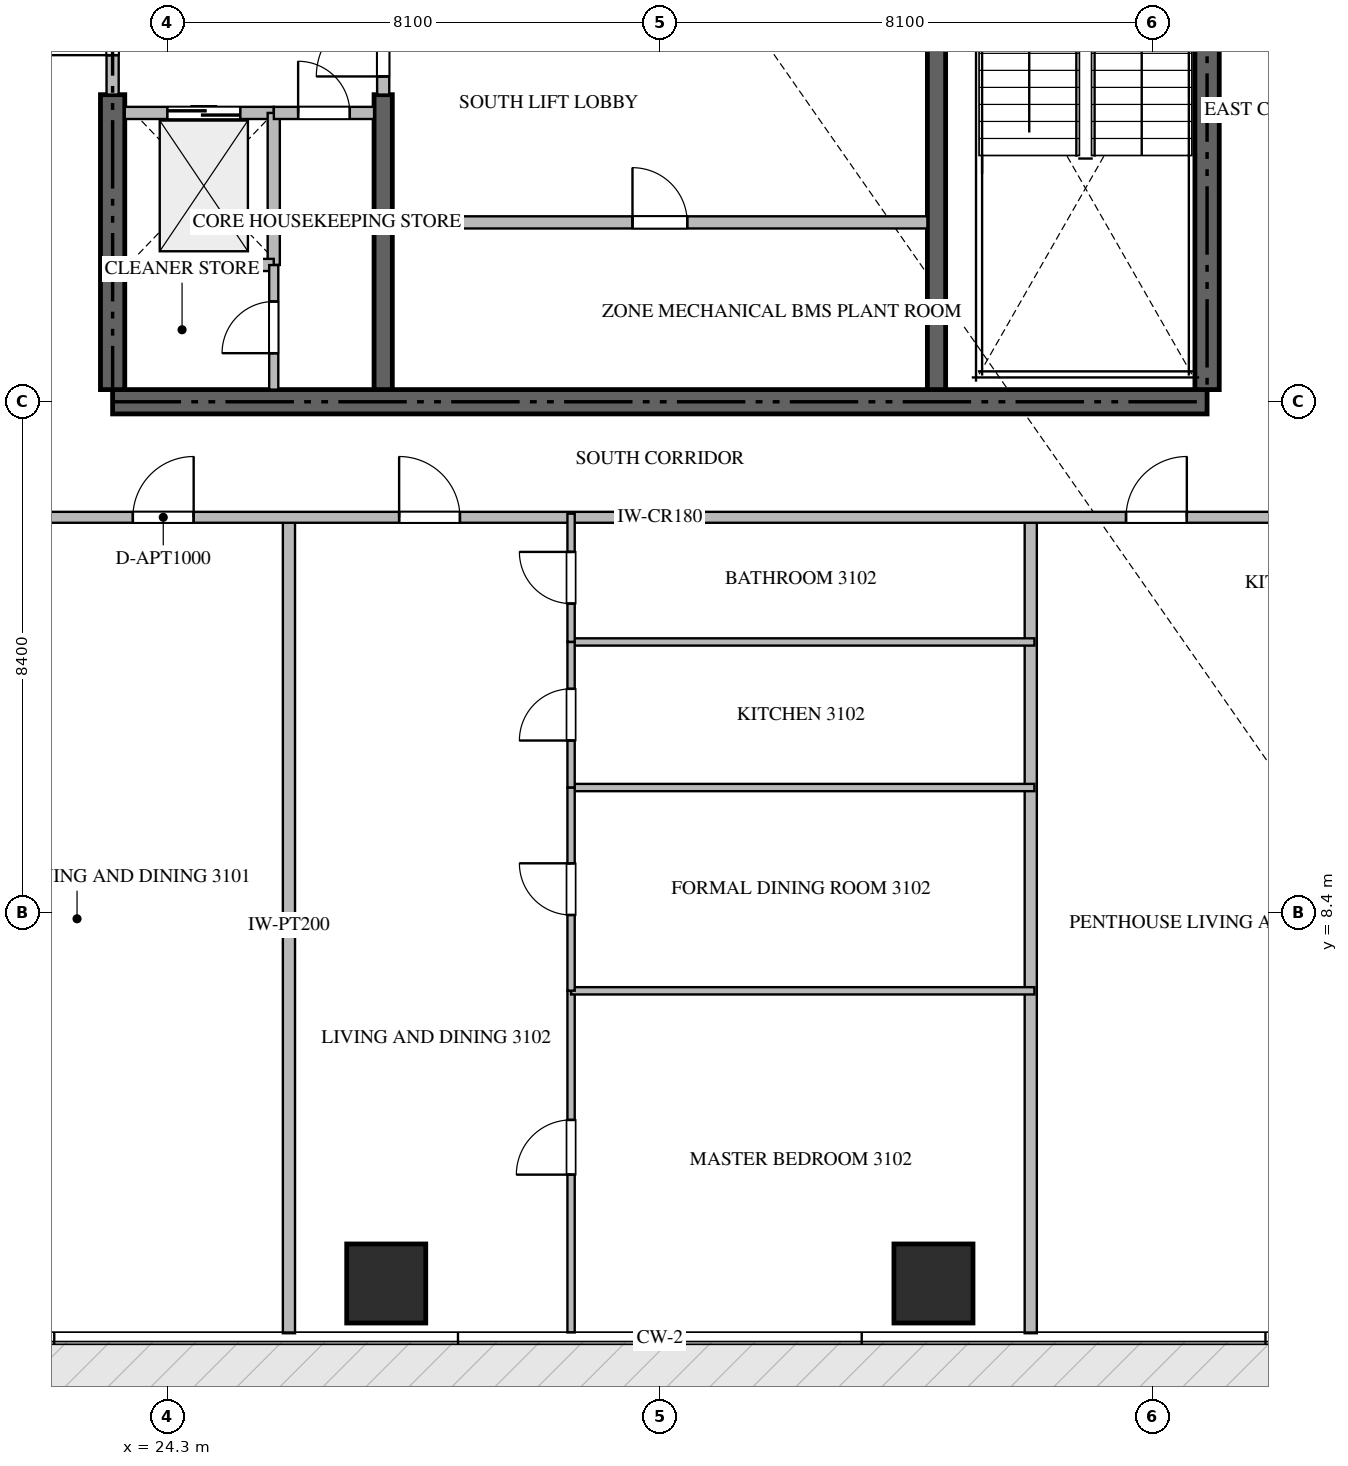
"""IFC4 building model, lengths in metres.
Left out: names, types, materials, properties, quantities, classifications, styles, units other than length and angle.
Written with IfcOpenShell. Run it as: python <this file> out.ifc"""

import sys

from ifc_helpers import new_model, si_unit, direction, frame, frame_2d, origin, origin_2d, place, context, subcontext, project, spatial, rectangle, extrude, source, transform, mapped, element, fill, save


model = new_model("IFC4")
c1 = context("Model", 3, precision=1e-05, world=origin(), true_north=direction((0.0, 1.0)))
c2 = subcontext(c1, "Body", "Model", "MODEL_VIEW")
j1 = project(units=[si_unit("LENGTHUNIT", "METRE"), si_unit("PLANEANGLEUNIT", "RADIAN")], contexts=[c1])
p1 = place(None, origin())
s1 = spatial("IfcSite", under=j1, at=p1, CompositionType="ELEMENT")
p2 = place(p1, origin())
s2 = spatial("IfcBuilding", under=s1, at=p2, CompositionType="ELEMENT")
p3 = place(p2, frame((0.0, 0.0, 127.65)))
s3 = spatial("IfcBuildingStorey", under=s2, at=p3, CompositionType="ELEMENT", Elevation=127.65)
p4 = place(p3, frame((23.4, 16.8, -0.26), z_axis=(0.0, 0.0, 1.0), x_axis=(1.0, 0.0, 0.0)))
e1 = element("IfcWall", 1, at=p4, inside=s3, PredefinedType="SHEAR", context=c2, shape_type="SweptSolid", body=[
    extrude(rectangle(XDim=18.0, YDim=0.4, at=frame_2d((9.0, 0.0))), origin(), (0.0, 0.0, 1.0), 3.748),
])
p5 = place(p3, frame((23.4, 17.0, -0.26), z_axis=(0.0, 0.0, 1.0), x_axis=(0.0, 1.0, 0.0)))
e2 = element("IfcWall", 2, at=p5, inside=s3, PredefinedType="SHEAR", context=c2, shape_type="SweptSolid", body=[
    extrude(rectangle(XDim=4.85, YDim=0.4, at=frame_2d((2.425, 0.0))), origin(), (0.0, 0.0, 1.0), 3.748),
])
p6 = place(p3, frame((41.4, 17.0, -0.26), z_axis=(0.0, 0.0, 1.0), x_axis=(0.0, 1.0, 0.0)))
e3 = element("IfcWall", 3, at=p6, inside=s3, PredefinedType="SHEAR", context=c2, shape_type="SweptSolid", body=[
    extrude(rectangle(XDim=8.35, YDim=0.4, at=frame_2d((4.175, 0.0))), origin(), (0.0, 0.0, 1.0), 3.748),
])
p7 = place(p3, frame((27.85, 17.0, -0.26), z_axis=(0.0, 0.0, 1.0), x_axis=(0.0, 1.0, 0.0)))
e4 = element("IfcWall", 4, at=p7, inside=s3, PredefinedType="SHEAR", context=c2, shape_type="SweptSolid", body=[
    extrude(rectangle(XDim=4.85, YDim=0.3, at=frame_2d((2.425, 0.0))), origin(), (0.0, 0.0, 1.0), 3.748),
])
p8 = place(p3, frame((36.95, 17.0, -0.26), z_axis=(0.0, 0.0, 1.0), x_axis=(0.0, 1.0, 0.0)))
e5 = element("IfcWall", 5, at=p8, inside=s3, PredefinedType="SHEAR", context=c2, shape_type="SweptSolid", body=[
    extrude(rectangle(XDim=8.35, YDim=0.3, at=frame_2d((4.175, 0.0))), origin(), (0.0, 0.0, 1.0), 3.748),
])
m1 = source(origin(), c2, "Body", "SweptSolid", [
    extrude(rectangle(XDim=1.3, YDim=1.3, at=origin_2d()), origin(), (0.0, 0.0, 1.0), 3.75),
])
for number, where, z_axis, x_axis in (
    (6, (27.9, 2.3, -0.26), (0.0, 0.0, 1.0), (1.0, 0.0, 0.0)),
    (7, (36.9, 2.3, -0.26), (0.0, 0.0, 1.0), (1.0, 0.0, 0.0)),
):
    element("IfcColumn", number, at=place(p3, frame(where, z_axis=z_axis, x_axis=x_axis)), inside=s3, PredefinedType="COLUMN", context=c2, shape_type="MappedRepresentation", body=[
        mapped(m1, transform((0.0, 0.0, 0.0), scale=1.0)),
    ])
p9 = place(p3, frame((23.6, 21.55, 0.0), z_axis=(0.0, 0.0, 1.0), x_axis=(1.0, 0.0, 0.0)))
e8 = element("IfcWall", 8, at=p9, inside=s3, PredefinedType="STANDARD", context=c2, shape_type="SweptSolid", body=[
    extrude(rectangle(XDim=2.45, YDim=0.2, at=frame_2d((1.225, 0.0))), origin(), (0.0, 0.0, 1.0), 3.49),
])
p10 = place(p9, frame((0.7, 0.0, 0.0)))
e9 = element("IfcOpeningElement", 9, at=p10, cuts=e8, PredefinedType="OPENING", context=c2, shape_type="SweptSolid", body=[
    extrude(rectangle(XDim=1.2, YDim=2.2, at=frame_2d((0.6, 1.1))), frame((0.0, 0.11, 0.0), z_axis=(0.0, -1.0, 0.0), x_axis=(1.0, 0.0, 0.0)), (0.0, 0.0, 1.0), 0.22),
])
p11 = place(p3, frame((26.05, 19.05, 0.0), z_axis=(0.0, 0.0, 1.0), x_axis=(0.0, 1.0, 0.0)))
e10 = element("IfcWall", 10, at=p11, inside=s3, PredefinedType="STANDARD", context=c2, shape_type="SweptSolid", body=[
    extrude(rectangle(XDim=2.5, YDim=0.2, at=frame_2d((1.25, 0.0))), origin(), (0.0, 0.0, 1.0), 3.49),
])
p12 = place(p3, frame((23.6, 19.05, 0.0), z_axis=(0.0, 0.0, 1.0), x_axis=(1.0, 0.0, 0.0)))
e11 = element("IfcWall", 11, at=p12, inside=s3, PredefinedType="STANDARD", context=c2, shape_type="SweptSolid", body=[
    extrude(rectangle(XDim=2.45, YDim=0.2, at=frame_2d((1.225, 0.0))), origin(), (0.0, 0.0, 1.0), 3.49),
])
p13 = place(p3, frame((26.052, 21.55, 0.0), z_axis=(0.0, 0.0, 1.0), x_axis=(1.0, 0.0, 0.0)))
e12 = element("IfcWall", 12, at=p13, inside=s3, PredefinedType="STANDARD", context=c2, shape_type="SweptSolid", body=[
    extrude(rectangle(XDim=1.648, YDim=0.2, at=frame_2d((0.824, 0.0))), origin(), (0.0, 0.0, 1.0), 3.49),
])
p14 = place(p13, frame((0.399, 0.0, 0.0)))
e13 = element("IfcOpeningElement", 13, at=p14, cuts=e12, PredefinedType="OPENING", context=c2, shape_type="SweptSolid", body=[
    extrude(rectangle(XDim=0.85, YDim=2.1, at=frame_2d((0.425, 1.05))), frame((0.0, 0.11, 0.0), z_axis=(0.0, -1.0, 0.0), x_axis=(1.0, 0.0, 0.0)), (0.0, 0.0, 1.0), 0.22),
])
p15 = place(p3, frame((23.4, 21.852, 0.0), z_axis=(0.0, 0.0, 1.0), x_axis=(0.0, 1.0, 0.0)))
e14 = element("IfcWall", 14, at=p15, inside=s3, PredefinedType="STANDARD", context=c2, shape_type="SweptSolid", body=[
    extrude(rectangle(XDim=2.396, YDim=0.2, at=frame_2d((1.198, 0.0))), origin(), (0.0, 0.0, 1.0), 3.49),
])
p16 = place(p15, frame((0.648, 0.0, 0.0)))
e15 = element("IfcOpeningElement", 15, at=p16, cuts=e14, PredefinedType="OPENING", context=c2, shape_type="SweptSolid", body=[
    extrude(rectangle(XDim=1.1, YDim=2.15, at=frame_2d((0.55, 1.075))), frame((0.0, 0.11, 0.0), z_axis=(0.0, -1.0, 0.0), x_axis=(1.0, 0.0, 0.0)), (0.0, 0.0, 1.0), 0.22),
])
p17 = place(p3, frame((27.85, 21.852, 0.0), z_axis=(0.0, 0.0, 1.0), x_axis=(0.0, 1.0, 0.0)))
e16 = element("IfcWall", 16, at=p17, inside=s3, PredefinedType="STANDARD", context=c2, shape_type="SweptSolid", body=[
    extrude(rectangle(XDim=1.696, YDim=0.2, at=frame_2d((0.848, 0.0))), origin(), (0.0, 0.0, 1.0), 3.49),
])
p18 = place(p17, frame((0.298, 0.0, 0.0)))
e17 = element("IfcOpeningElement", 17, at=p18, cuts=e16, PredefinedType="OPENING", context=c2, shape_type="SweptSolid", body=[
    extrude(rectangle(XDim=1.1, YDim=2.15, at=frame_2d((0.55, 1.075))), frame((0.0, 0.11, 0.0), z_axis=(0.0, -1.0, 0.0), x_axis=(1.0, 0.0, 0.0)), (0.0, 0.0, 1.0), 0.22),
])
p19 = place(p3, frame((26.05, 17.0, 0.0), z_axis=(0.0, 0.0, 1.0), x_axis=(0.0, 1.0, 0.0)))
e18 = element("IfcWall", 18, at=p19, inside=s3, PredefinedType="PARTITIONING", context=c2, shape_type="SweptSolid", body=[
    extrude(rectangle(XDim=2.048, YDim=0.15, at=frame_2d((1.024, 0.0))), origin(), (0.0, 0.0, 1.0), 3.49),
])
p20 = place(p19, frame((0.599, 0.0, 0.0)))
e19 = element("IfcOpeningElement", 19, at=p20, cuts=e18, PredefinedType="OPENING", context=c2, shape_type="SweptSolid", body=[
    extrude(rectangle(XDim=0.85, YDim=2.1, at=frame_2d((0.425, 1.05))), frame((0.0, 0.085, 0.0), z_axis=(0.0, -1.0, 0.0), x_axis=(1.0, 0.0, 0.0)), (0.0, 0.0, 1.0), 0.17),
])
p21 = place(p3, frame((28.0, 19.75, 0.0), z_axis=(0.0, 0.0, 1.0), x_axis=(1.0, 0.0, 0.0)))
e20 = element("IfcWall", 20, at=p21, inside=s3, PredefinedType="STANDARD", context=c2, shape_type="SweptSolid", body=[
    extrude(rectangle(XDim=8.8, YDim=0.2, at=frame_2d((4.4, 0.0))), origin(), (0.0, 0.0, 1.0), 3.49),
])
p22 = place(p21, frame((3.95, 0.0, 0.0)))
e21 = element("IfcOpeningElement", 21, at=p22, cuts=e20, PredefinedType="OPENING", context=c2, shape_type="SweptSolid", body=[
    extrude(rectangle(XDim=0.9, YDim=2.1, at=frame_2d((0.45, 1.05))), frame((0.0, 0.11, 0.0), z_axis=(0.0, -1.0, 0.0), x_axis=(1.0, 0.0, 0.0)), (0.0, 0.0, 1.0), 0.22),
])
for number, where, z_axis, x_axis in (
    (22, (26.3, 1.482, 0.0), (0.0, 0.0, 1.0), (0.0, 1.0, 0.0)),
    (23, (38.5, 1.482, 0.0), (0.0, 0.0, 1.0), (0.0, 1.0, 0.0)),
):
    element("IfcWall", number, at=place(p3, frame(where, z_axis=z_axis, x_axis=x_axis)), inside=s3, PredefinedType="PARTITIONING", context=c2, shape_type="SweptSolid", body=[
        extrude(rectangle(XDim=13.418, YDim=0.2, at=frame_2d((6.709, 0.0))), origin(), (0.0, 0.0, 1.0), 3.49),
    ])
p23 = place(p3, frame((20.952, 14.9, 0.0), z_axis=(0.0, 0.0, 1.0), x_axis=(1.0, 0.0, 0.0)))
e24 = element("IfcWall", 24, at=p23, inside=s3, PredefinedType="PARTITIONING", context=c2, shape_type="SweptSolid", body=[
    extrude(rectangle(XDim=22.896, YDim=0.18, at=frame_2d((11.448, 0.0))), origin(), (0.0, 0.0, 1.0), 3.49),
])
p24 = place(p23, frame((2.781, 0.0, 0.0)))
e25 = element("IfcOpeningElement", 25, at=p24, cuts=e24, PredefinedType="OPENING", context=c2, shape_type="SweptSolid", body=[
    extrude(rectangle(XDim=1.0, YDim=2.15, at=frame_2d((0.5, 1.075))), frame((0.0, 0.1, 0.0), z_axis=(0.0, -1.0, 0.0), x_axis=(1.0, 0.0, 0.0)), (0.0, 0.0, 1.0), 0.2),
])
p25 = place(p23, frame((7.16, 0.0, 0.0)))
e26 = element("IfcOpeningElement", 26, at=p25, cuts=e24, PredefinedType="OPENING", context=c2, shape_type="SweptSolid", body=[
    extrude(rectangle(XDim=1.0, YDim=2.15, at=frame_2d((0.5, 1.075))), frame((0.0, 0.1, 0.0), z_axis=(0.0, -1.0, 0.0), x_axis=(1.0, 0.0, 0.0)), (0.0, 0.0, 1.0), 0.2),
])
p26 = place(p23, frame((19.115, 0.0, 0.0)))
e27 = element("IfcOpeningElement", 27, at=p26, cuts=e24, PredefinedType="OPENING", context=c2, shape_type="SweptSolid", body=[
    extrude(rectangle(XDim=1.0, YDim=2.15, at=frame_2d((0.5, 1.075))), frame((0.0, 0.1, 0.0), z_axis=(0.0, -1.0, 0.0), x_axis=(1.0, 0.0, 0.0)), (0.0, 0.0, 1.0), 0.2),
])
p27 = place(p3, frame((30.94, 1.495, 0.0), z_axis=(0.0, 0.0, 1.0), x_axis=(0.0, 1.0, 0.0)))
e28 = element("IfcWall", 28, at=p27, inside=s3, PredefinedType="PARTITIONING", context=c2, shape_type="SweptSolid", body=[
    extrude(rectangle(XDim=5.618, YDim=0.12, at=frame_2d((2.809, 0.0))), origin(), (0.0, 0.0, 1.0), 3.49),
])
p28 = place(p27, frame((2.595, 0.0, 0.0)))
e29 = element("IfcOpeningElement", 29, at=p28, cuts=e28, PredefinedType="OPENING", context=c2, shape_type="SweptSolid", body=[
    extrude(rectangle(XDim=0.9, YDim=2.1, at=frame_2d((0.45, 1.05))), frame((0.0, 0.07, 0.0), z_axis=(0.0, -1.0, 0.0), x_axis=(1.0, 0.0, 0.0)), (0.0, 0.0, 1.0), 0.14),
])
p29 = place(p3, frame((30.94, 7.113, 0.0), z_axis=(0.0, 0.0, 1.0), x_axis=(1.0, 0.0, 0.0)))
e30 = element("IfcWall", 30, at=p29, inside=s3, PredefinedType="PARTITIONING", context=c2, shape_type="SweptSolid", body=[
    extrude(rectangle(XDim=7.62, YDim=0.12, at=frame_2d((3.81, 0.0))), origin(), (0.0, 0.0, 1.0), 3.49),
])
p30 = place(p3, frame((30.94, 10.456, 0.0), z_axis=(0.0, 0.0, 1.0), x_axis=(1.0, 0.0, 0.0)))
e31 = element("IfcWall", 31, at=p30, inside=s3, PredefinedType="PARTITIONING", context=c2, shape_type="SweptSolid", body=[
    extrude(rectangle(XDim=7.62, YDim=0.12, at=frame_2d((3.81, 0.0))), origin(), (0.0, 0.0, 1.0), 2.972),
])
p31 = place(p3, frame((30.94, 12.85, 0.0), z_axis=(0.0, 0.0, 1.0), x_axis=(1.0, 0.0, 0.0)))
e32 = element("IfcWall", 32, at=p31, inside=s3, PredefinedType="PARTITIONING", context=c2, shape_type="SweptSolid", body=[
    extrude(rectangle(XDim=7.62, YDim=0.12, at=frame_2d((3.81, 0.0))), origin(), (0.0, 0.0, 1.0), 3.49),
])
p32 = place(p3, frame((30.94, 7.115, 0.0), z_axis=(0.0, 0.0, 1.0), x_axis=(0.0, 1.0, 0.0)))
e33 = element("IfcWall", 33, at=p32, inside=s3, PredefinedType="PARTITIONING", context=c2, shape_type="SweptSolid", body=[
    extrude(rectangle(XDim=3.341, YDim=0.12, at=frame_2d((1.67, 0.0))), origin(), (0.0, 0.0, 1.0), 3.49),
])
p33 = place(p32, frame((1.245, 0.0, 0.0)))
e34 = element("IfcOpeningElement", 34, at=p33, cuts=e33, PredefinedType="OPENING", context=c2, shape_type="SweptSolid", body=[
    extrude(rectangle(XDim=0.85, YDim=2.1, at=frame_2d((0.425, 1.05))), frame((0.0, 0.07, 0.0), z_axis=(0.0, -1.0, 0.0), x_axis=(1.0, 0.0, 0.0)), (0.0, 0.0, 1.0), 0.14),
])
p34 = place(p3, frame((30.94, 10.458, 0.0), z_axis=(0.0, 0.0, 1.0), x_axis=(0.0, 1.0, 0.0)))
e35 = element("IfcWall", 35, at=p34, inside=s3, PredefinedType="PARTITIONING", context=c2, shape_type="SweptSolid", body=[
    extrude(rectangle(XDim=2.392, YDim=0.12, at=frame_2d((1.196, 0.0))), origin(), (0.0, 0.0, 1.0), 3.49),
])
p35 = place(p34, frame((0.771, 0.0, 0.0)))
e36 = element("IfcOpeningElement", 36, at=p35, cuts=e35, PredefinedType="OPENING", context=c2, shape_type="SweptSolid", body=[
    extrude(rectangle(XDim=0.85, YDim=2.1, at=frame_2d((0.425, 1.05))), frame((0.0, 0.07, 0.0), z_axis=(0.0, -1.0, 0.0), x_axis=(1.0, 0.0, 0.0)), (0.0, 0.0, 1.0), 0.14),
])
p36 = place(p3, frame((30.94, 12.852, 0.0), z_axis=(0.0, 0.0, 1.0), x_axis=(0.0, 1.0, 0.0)))
e37 = element("IfcWall", 37, at=p36, inside=s3, PredefinedType="PARTITIONING", context=c2, shape_type="SweptSolid", body=[
    extrude(rectangle(XDim=2.108, YDim=0.12, at=frame_2d((1.054, 0.0))), origin(), (0.0, 0.0, 1.0), 3.49),
])
p37 = place(p36, frame((0.629, 0.0, 0.0)))
e38 = element("IfcOpeningElement", 38, at=p37, cuts=e37, PredefinedType="OPENING", context=c2, shape_type="SweptSolid", body=[
    extrude(rectangle(XDim=0.85, YDim=2.1, at=frame_2d((0.425, 1.05))), frame((0.0, 0.07, 0.0), z_axis=(0.0, -1.0, 0.0), x_axis=(1.0, 0.0, 0.0)), (0.0, 0.0, 1.0), 0.14),
])
m2 = source(origin(), c2, "Body", "SweptSolid", [
    extrude(rectangle(XDim=1.2, YDim=2.2, at=frame_2d((0.6, 1.1))), frame((0.0, 0.025, 0.0), z_axis=(0.0, -1.0, 0.0), x_axis=(1.0, 0.0, 0.0)), (0.0, 0.0, 1.0), 0.05),
])
p38 = place(p10, origin())
e39 = element("IfcDoor", 39, at=p38, inside=s3, OperationType="DOUBLE_DOOR_SLIDING", PredefinedType="DOOR", context=c2, shape_type="MappedRepresentation", body=[
    mapped(m2, transform((0.0, 0.0, 0.0), scale=1.0)),
])
fill(e9, e39)
m3 = source(origin(), c2, "Body", "SweptSolid", [
    extrude(rectangle(XDim=0.85, YDim=2.1, at=frame_2d((0.425, 1.05))), frame((0.0, 0.025, 0.0), z_axis=(0.0, -1.0, 0.0), x_axis=(1.0, 0.0, 0.0)), (0.0, 0.0, 1.0), 0.05),
])
p39 = place(p14, origin())
e40 = element("IfcDoor", 40, at=p39, inside=s3, OperationType="SINGLE_SWING_LEFT", PredefinedType="DOOR", context=c2, shape_type="MappedRepresentation", body=[
    mapped(m3, transform((0.0, 0.0, 0.0), scale=1.0)),
])
fill(e13, e40)
m4 = source(origin(), c2, "Body", "SweptSolid", [
    extrude(rectangle(XDim=1.1, YDim=2.15, at=frame_2d((0.55, 1.075))), frame((0.0, 0.025, 0.0), z_axis=(0.0, -1.0, 0.0), x_axis=(1.0, 0.0, 0.0)), (0.0, 0.0, 1.0), 0.05),
])
p40 = place(p16, origin())
e41 = element("IfcDoor", 41, at=p40, inside=s3, OperationType="SINGLE_SWING_LEFT", PredefinedType="DOOR", context=c2, shape_type="MappedRepresentation", body=[
    mapped(m4, transform((0.0, 0.0, 0.0), scale=1.0)),
])
fill(e15, e41)
p41 = place(p18, origin())
e42 = element("IfcDoor", 42, at=p41, inside=s3, OperationType="SINGLE_SWING_LEFT", PredefinedType="DOOR", context=c2, shape_type="MappedRepresentation", body=[
    mapped(m4, transform((0.0, 0.0, 0.0), scale=1.0)),
])
fill(e17, e42)
p42 = place(p20, origin())
e43 = element("IfcDoor", 43, at=p42, inside=s3, OperationType="SINGLE_SWING_LEFT", PredefinedType="DOOR", context=c2, shape_type="MappedRepresentation", body=[
    mapped(m3, transform((0.0, 0.0, 0.0), scale=1.0)),
])
fill(e19, e43)
m5 = source(origin(), c2, "Body", "SweptSolid", [
    extrude(rectangle(XDim=0.9, YDim=2.1, at=frame_2d((0.45, 1.05))), frame((0.0, 0.025, 0.0), z_axis=(0.0, -1.0, 0.0), x_axis=(1.0, 0.0, 0.0)), (0.0, 0.0, 1.0), 0.05),
])
p43 = place(p22, origin())
e44 = element("IfcDoor", 44, at=p43, inside=s3, OperationType="SINGLE_SWING_LEFT", PredefinedType="DOOR", context=c2, shape_type="MappedRepresentation", body=[
    mapped(m5, transform((0.0, 0.0, 0.0), scale=1.0)),
])
fill(e21, e44)
m6 = source(origin(), c2, "Body", "SweptSolid", [
    extrude(rectangle(XDim=1.0, YDim=2.15, at=frame_2d((0.5, 1.075))), frame((0.0, 0.025, 0.0), z_axis=(0.0, -1.0, 0.0), x_axis=(1.0, 0.0, 0.0)), (0.0, 0.0, 1.0), 0.05),
])
p44 = place(p24, origin())
e45 = element("IfcDoor", 45, at=p44, inside=s3, OperationType="SINGLE_SWING_RIGHT", PredefinedType="DOOR", context=c2, shape_type="MappedRepresentation", body=[
    mapped(m6, transform((0.0, 0.0, 0.0), scale=1.0)),
])
fill(e25, e45)
p45 = place(p25, origin())
e46 = element("IfcDoor", 46, at=p45, inside=s3, OperationType="SINGLE_SWING_LEFT", PredefinedType="DOOR", context=c2, shape_type="MappedRepresentation", body=[
    mapped(m6, transform((0.0, 0.0, 0.0), scale=1.0)),
])
fill(e26, e46)
p46 = place(p26, origin())
e47 = element("IfcDoor", 47, at=p46, inside=s3, OperationType="SINGLE_SWING_RIGHT", PredefinedType="DOOR", context=c2, shape_type="MappedRepresentation", body=[
    mapped(m6, transform((0.0, 0.0, 0.0), scale=1.0)),
])
fill(e27, e47)
p47 = place(p28, origin())
e48 = element("IfcDoor", 48, at=p47, inside=s3, OperationType="SINGLE_SWING_LEFT", PredefinedType="DOOR", context=c2, shape_type="MappedRepresentation", body=[
    mapped(m5, transform((0.0, 0.0, 0.0), scale=1.0)),
])
fill(e29, e48)
p48 = place(p33, origin())
e49 = element("IfcDoor", 49, at=p48, inside=s3, OperationType="SINGLE_SWING_RIGHT", PredefinedType="DOOR", context=c2, shape_type="MappedRepresentation", body=[
    mapped(m3, transform((0.0, 0.0, 0.0), scale=1.0)),
])
fill(e34, e49)
p49 = place(p35, origin())
e50 = element("IfcDoor", 50, at=p49, inside=s3, OperationType="SINGLE_SWING_LEFT", PredefinedType="DOOR", context=c2, shape_type="MappedRepresentation", body=[
    mapped(m3, transform((0.0, 0.0, 0.0), scale=1.0)),
])
fill(e36, e50)
p50 = place(p37, origin())
e51 = element("IfcDoor", 51, at=p50, inside=s3, OperationType="SINGLE_SWING_RIGHT", PredefinedType="DOOR", context=c2, shape_type="MappedRepresentation", body=[
    mapped(m3, transform((0.0, 0.0, 0.0), scale=1.0)),
])
fill(e38, e51)
save(model, sys.argv[1])
